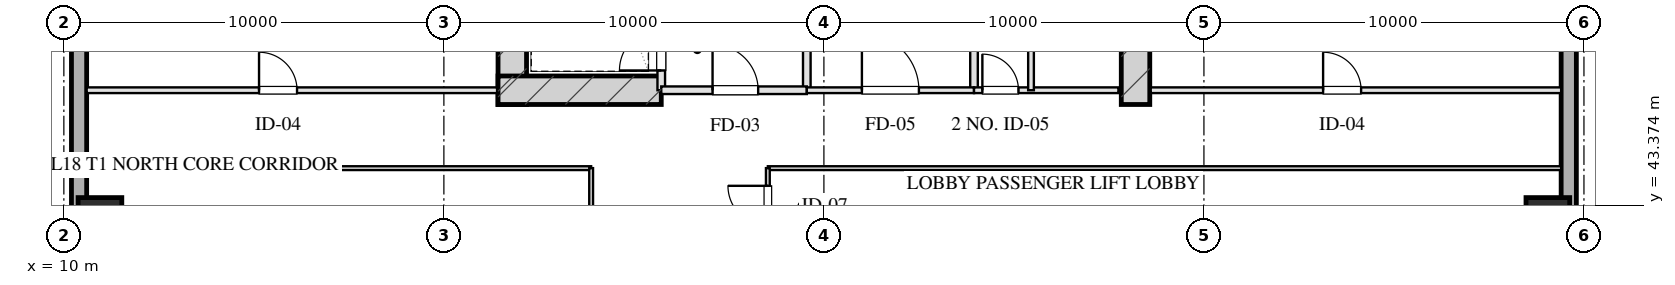
"""IFC4 building model, lengths in metres.
Left out: names, types, materials, properties, quantities, classifications, styles, units other than length and angle.
Written with IfcOpenShell. Run it as: python <this file> out.ifc"""

import sys

from ifc_helpers import new_model, si_unit, direction, frame, frame_2d, origin, origin_2d, place, context, subcontext, project, spatial, rectangle, hollow_rectangle, extrude, element, fill, save


model = new_model("IFC4")
c1 = context("Model", 3, precision=1e-05, world=origin(), true_north=direction((0.0, 1.0)))
c2 = subcontext(c1, "Body", "Model", "MODEL_VIEW")
j1 = project(units=[si_unit("LENGTHUNIT", "METRE"), si_unit("PLANEANGLEUNIT", "RADIAN")], contexts=[c1])
p1 = place(None, origin())
s1 = spatial("IfcSite", under=j1, at=p1, CompositionType="ELEMENT")
p2 = place(p1, origin())
s2 = spatial("IfcBuilding", under=s1, at=p2, CompositionType="ELEMENT")
p3 = place(p2, frame((0.0, 0.0, 74.75)))
s3 = spatial("IfcBuildingStorey", under=s2, at=p3, CompositionType="ELEMENT", Elevation=74.75)
for number, where, z_axis, x_axis in (
    (1, (21.8, 46.025, 0.0), (0.0, 0.0, 1.0), (0.0, 1.0, 0.0)),
    (2, (38.2, 46.025, 0.0), (0.0, 0.0, 1.0), (0.0, 1.0, 0.0)),
):
    element("IfcWall", number, at=place(p3, frame(where, z_axis=z_axis, x_axis=x_axis)), inside=s3, PredefinedType="SHEAR", context=c2, shape_type="SweptSolid", body=[
        extrude(rectangle(XDim=9.63, YDim=0.75, at=frame_2d((4.815, 0.0))), origin(), (0.0, 0.0, 1.0), 3.45),
    ])
p4 = place(p3, frame((21.425, 46.4, 0.0), z_axis=(0.0, 0.0, 1.0), x_axis=(1.0, 0.0, 0.0)))
e3 = element("IfcWall", 3, at=p4, inside=s3, PredefinedType="SHEAR", context=c2, shape_type="SweptSolid", body=[
    extrude(rectangle(XDim=4.295, YDim=0.75, at=frame_2d((2.147, 0.0))), origin(), (0.0, 0.0, 1.0), 3.45),
])
for number, where, z_axis, x_axis in (
    (4, (10.95, 43.0, 0.0), (0.0, 0.0, 1.0), (1.0, 0.0, 0.0)),
    (5, (49.05, 43.0, 0.0), (0.0, 0.0, 1.0), (1.0, 0.0, 0.0)),
):
    element("IfcColumn", number, at=place(p3, frame(where, z_axis=z_axis, x_axis=x_axis)), inside=s3, PredefinedType="COLUMN", context=c2, shape_type="SweptSolid", body=[
        extrude(hollow_rectangle(XDim=1.15, YDim=1.15, WallThickness=0.04, at=origin_2d()), origin(), (0.0, 0.0, 1.0), 3.451),
    ])
p5 = place(p3, frame((10.4, 7.2, 0.0), z_axis=(0.0, 0.0, 1.0), x_axis=(0.0, 1.0, 0.0)))
e6 = element("IfcWall", 6, at=p5, inside=s3, PredefinedType="SOLIDWALL", context=c2, shape_type="SweptSolid", body=[
    extrude(rectangle(XDim=53.6, YDim=0.4, at=frame_2d((26.8, 0.0))), origin(), (0.0, 0.0, 1.0), 2.61),
])
p6 = place(p5, frame((19.15, 0.0, 0.75)))
e7 = element("IfcOpeningElement", 7, at=p6, cuts=e6, PredefinedType="OPENING", context=c2, shape_type="SweptSolid", body=[
    extrude(rectangle(XDim=2.5, YDim=1.46, at=frame_2d((1.25, 0.73))), frame((0.0, 0.21, 0.0), z_axis=(0.0, -1.0, 0.0), x_axis=(1.0, 0.0, 0.0)), (0.0, 0.0, 1.0), 0.42),
])
p7 = place(p5, frame((28.15, 0.0, 0.75)))
e8 = element("IfcOpeningElement", 8, at=p7, cuts=e6, PredefinedType="OPENING", context=c2, shape_type="SweptSolid", body=[
    extrude(rectangle(XDim=2.5, YDim=1.46, at=frame_2d((1.25, 0.73))), frame((0.0, 0.21, 0.0), z_axis=(0.0, -1.0, 0.0), x_axis=(1.0, 0.0, 0.0)), (0.0, 0.0, 1.0), 0.42),
])
p8 = place(p5, frame((31.95, 0.0, 0.75)))
e9 = element("IfcOpeningElement", 9, at=p8, cuts=e6, PredefinedType="OPENING", context=c2, shape_type="SweptSolid", body=[
    extrude(rectangle(XDim=2.5, YDim=1.46, at=frame_2d((1.25, 0.73))), frame((0.0, 0.21, 0.0), z_axis=(0.0, -1.0, 0.0), x_axis=(1.0, 0.0, 0.0)), (0.0, 0.0, 1.0), 0.42),
])
p9 = place(p3, frame((49.6, 60.8, 0.0), z_axis=(0.0, 0.0, 1.0), x_axis=(0.0, -1.0, 0.0)))
e10 = element("IfcWall", 10, at=p9, inside=s3, PredefinedType="SOLIDWALL", context=c2, shape_type="SweptSolid", body=[
    extrude(rectangle(XDim=53.6, YDim=0.4, at=frame_2d((26.8, 0.0))), origin(), (0.0, 0.0, 1.0), 2.61),
])
p10 = place(p3, frame((25.72, 46.4, 0.0), z_axis=(0.0, 0.0, 1.0), x_axis=(0.0, 1.0, 0.0)))
e11 = element("IfcWall", 11, at=p10, inside=s3, PredefinedType="PARTITIONING", context=c2, shape_type="SweptSolid", body=[
    extrude(rectangle(XDim=1.9, YDim=0.2, at=frame_2d((0.95, 0.0))), origin(), (0.0, 0.0, 1.0), 3.175),
])
p11 = place(p10, frame((0.52, 0.0, 0.0)))
e12 = element("IfcOpeningElement", 12, at=p11, cuts=e11, PredefinedType="OPENING", context=c2, shape_type="SweptSolid", body=[
    extrude(rectangle(XDim=1.1, YDim=2.05, at=frame_2d((0.55, 1.025))), frame((0.0, 0.11, 0.0), z_axis=(0.0, -1.0, 0.0), x_axis=(1.0, 0.0, 0.0)), (0.0, 0.0, 1.0), 0.22),
])
p12 = place(p3, frame((29.55, 46.4, 0.0), z_axis=(0.0, 0.0, 1.0), x_axis=(0.0, 1.0, 0.0)))
e13 = element("IfcWall", 13, at=p12, inside=s3, PredefinedType="PARTITIONING", context=c2, shape_type="SweptSolid", body=[
    extrude(rectangle(XDim=8.43, YDim=0.2, at=frame_2d((4.215, 0.0))), origin(), (0.0, 0.0, 1.0), 3.175),
])
p13 = place(p3, frame((25.72, 46.4, 0.0), z_axis=(0.0, 0.0, 1.0), x_axis=(1.0, 0.0, 0.0)))
e14 = element("IfcWall", 14, at=p13, inside=s3, PredefinedType="PARTITIONING", context=c2, shape_type="SweptSolid", body=[
    extrude(rectangle(XDim=3.83, YDim=0.2, at=frame_2d((1.915, 0.0))), origin(), (0.0, 0.0, 1.0), 3.175),
])
p14 = place(p13, frame((1.35, 0.0, 0.0)))
e15 = element("IfcOpeningElement", 15, at=p14, cuts=e14, PredefinedType="OPENING", context=c2, shape_type="SweptSolid", body=[
    extrude(rectangle(XDim=1.2, YDim=2.05, at=frame_2d((0.6, 1.025))), frame((0.0, 0.11, 0.0), z_axis=(0.0, -1.0, 0.0), x_axis=(1.0, 0.0, 0.0)), (0.0, 0.0, 1.0), 0.22),
])
p15 = place(p3, frame((33.95, 46.4, 0.0), z_axis=(0.0, 0.0, 1.0), x_axis=(0.0, 1.0, 0.0)))
e16 = element("IfcWall", 16, at=p15, inside=s3, PredefinedType="PARTITIONING", context=c2, shape_type="SweptSolid", body=[
    extrude(rectangle(XDim=8.43, YDim=0.2, at=frame_2d((4.215, 0.0))), origin(), (0.0, 0.0, 1.0), 3.175),
])
p16 = place(p3, frame((29.55, 46.4, 0.0), z_axis=(0.0, 0.0, 1.0), x_axis=(1.0, 0.0, 0.0)))
e17 = element("IfcWall", 17, at=p16, inside=s3, PredefinedType="PARTITIONING", context=c2, shape_type="SweptSolid", body=[
    extrude(rectangle(XDim=4.4, YDim=0.15, at=frame_2d((2.2, 0.0))), origin(), (0.0, 0.0, 1.0), 3.175),
])
p17 = place(p16, frame((1.45, 0.0, 0.0)))
e18 = element("IfcOpeningElement", 18, at=p17, cuts=e17, PredefinedType="OPENING", context=c2, shape_type="SweptSolid", body=[
    extrude(rectangle(XDim=1.5, YDim=2.05, at=frame_2d((0.75, 1.025))), frame((0.0, 0.085, 0.0), z_axis=(0.0, -1.0, 0.0), x_axis=(1.0, 0.0, 0.0)), (0.0, 0.0, 1.0), 0.17),
])
p18 = place(p3, frame((33.95, 46.4, 0.0), z_axis=(0.0, 0.0, 1.0), x_axis=(1.0, 0.0, 0.0)))
e19 = element("IfcWall", 19, at=p18, inside=s3, PredefinedType="PARTITIONING", context=c2, shape_type="SweptSolid", body=[
    extrude(rectangle(XDim=3.8, YDim=0.15, at=frame_2d((1.9, 0.0))), origin(), (0.0, 0.0, 1.0), 3.175),
])
p19 = place(p18, frame((0.22, 0.0, 0.0)))
e20 = element("IfcOpeningElement", 20, at=p19, cuts=e19, PredefinedType="OPENING", context=c2, shape_type="SweptSolid", body=[
    extrude(rectangle(XDim=0.95, YDim=2.05, at=frame_2d((0.475, 1.025))), frame((0.0, 0.085, 0.0), z_axis=(0.0, -1.0, 0.0), x_axis=(1.0, 0.0, 0.0)), (0.0, 0.0, 1.0), 0.17),
])
p20 = place(p3, frame((35.45, 46.4, 0.0), z_axis=(0.0, 0.0, 1.0), x_axis=(0.0, 1.0, 0.0)))
e21 = element("IfcWall", 21, at=p20, inside=s3, PredefinedType="PARTITIONING", context=c2, shape_type="SweptSolid", body=[
    extrude(rectangle(XDim=8.43, YDim=0.15, at=frame_2d((4.215, 0.0))), origin(), (0.0, 0.0, 1.0), 2.765),
])
p21 = place(p20, frame((2.55, 0.0, 0.0)))
e22 = element("IfcOpeningElement", 22, at=p21, cuts=e21, PredefinedType="OPENING", context=c2, shape_type="SweptSolid", body=[
    extrude(rectangle(XDim=0.95, YDim=2.05, at=frame_2d((0.475, 1.025))), frame((0.0, 0.085, 0.0), z_axis=(0.0, -1.0, 0.0), x_axis=(1.0, 0.0, 0.0)), (0.0, 0.0, 1.0), 0.17),
])
p22 = place(p20, frame((4.7, 0.0, 0.0)))
e23 = element("IfcOpeningElement", 23, at=p22, cuts=e21, PredefinedType="OPENING", context=c2, shape_type="SweptSolid", body=[
    extrude(rectangle(XDim=0.9, YDim=2.05, at=frame_2d((0.45, 1.025))), frame((0.0, 0.085, 0.0), z_axis=(0.0, -1.0, 0.0), x_axis=(1.0, 0.0, 0.0)), (0.0, 0.0, 1.0), 0.17),
])
p23 = place(p20, frame((6.8, 0.0, 0.0)))
e24 = element("IfcOpeningElement", 24, at=p23, cuts=e21, PredefinedType="OPENING", context=c2, shape_type="SweptSolid", body=[
    extrude(rectangle(XDim=0.9, YDim=2.05, at=frame_2d((0.45, 1.025))), frame((0.0, 0.085, 0.0), z_axis=(0.0, -1.0, 0.0), x_axis=(1.0, 0.0, 0.0)), (0.0, 0.0, 1.0), 0.17),
])
p24 = place(p3, frame((10.6, 46.4, 0.0), z_axis=(0.0, 0.0, 1.0), x_axis=(1.0, 0.0, 0.0)))
e25 = element("IfcWall", 25, at=p24, inside=s3, PredefinedType="PARTITIONING", context=c2, shape_type="SweptSolid", body=[
    extrude(rectangle(XDim=10.8, YDim=0.15, at=frame_2d((5.4, 0.0))), origin(), (0.0, 0.0, 1.0), 3.175),
])
p25 = place(p24, frame((4.536, 0.0, 0.0)))
e26 = element("IfcOpeningElement", 26, at=p25, cuts=e25, PredefinedType="OPENING", context=c2, shape_type="SweptSolid", body=[
    extrude(rectangle(XDim=1.0, YDim=2.05, at=frame_2d((0.5, 1.025))), frame((0.0, 0.085, 0.0), z_axis=(0.0, -1.0, 0.0), x_axis=(1.0, 0.0, 0.0)), (0.0, 0.0, 1.0), 0.17),
])
p26 = place(p3, frame((38.6, 46.4, 0.0), z_axis=(0.0, 0.0, 1.0), x_axis=(1.0, 0.0, 0.0)))
e27 = element("IfcWall", 27, at=p26, inside=s3, PredefinedType="PARTITIONING", context=c2, shape_type="SweptSolid", body=[
    extrude(rectangle(XDim=10.8, YDim=0.15, at=frame_2d((5.4, 0.0))), origin(), (0.0, 0.0, 1.0), 3.175),
])
p27 = place(p26, frame((4.536, 0.0, 0.0)))
e28 = element("IfcOpeningElement", 28, at=p27, cuts=e27, PredefinedType="OPENING", context=c2, shape_type="SweptSolid", body=[
    extrude(rectangle(XDim=1.0, YDim=2.05, at=frame_2d((0.5, 1.025))), frame((0.0, 0.085, 0.0), z_axis=(0.0, -1.0, 0.0), x_axis=(1.0, 0.0, 0.0)), (0.0, 0.0, 1.0), 0.17),
])
p28 = place(p3, frame((10.6, 44.35, 0.0), z_axis=(0.0, 0.0, 1.0), x_axis=(1.0, 0.0, 0.0)))
e29 = element("IfcWall", 29, at=p28, inside=s3, PredefinedType="MOVABLE", context=c2, shape_type="SweptSolid", body=[
    extrude(rectangle(XDim=13.275, YDim=0.1, at=frame_2d((6.637, 0.0))), origin(), (0.0, 0.0, 1.0), 3.175),
])
p29 = place(p3, frame((28.525, 44.35, 0.0), z_axis=(0.0, 0.0, 1.0), x_axis=(1.0, 0.0, 0.0)))
e30 = element("IfcWall", 30, at=p29, inside=s3, PredefinedType="MOVABLE", context=c2, shape_type="SweptSolid", body=[
    extrude(rectangle(XDim=20.875, YDim=0.1, at=frame_2d((10.438, 0.0))), origin(), (0.0, 0.0, 1.0), 3.175),
])
p30 = place(p3, frame((23.875, 23.65, 0.0), z_axis=(0.0, 0.0, 1.0), x_axis=(0.0, 1.0, 0.0)))
e31 = element("IfcWall", 31, at=p30, inside=s3, PredefinedType="MOVABLE", context=c2, shape_type="SweptSolid", body=[
    extrude(rectangle(XDim=20.7, YDim=0.1, at=frame_2d((10.35, 0.0))), origin(), (0.0, 0.0, 1.0), 3.175),
])
p31 = place(p30, frame((4.075, 0.0, 0.0)))
e32 = element("IfcOpeningElement", 32, at=p31, cuts=e31, PredefinedType="OPENING", context=c2, shape_type="SweptSolid", body=[
    extrude(rectangle(XDim=1.05, YDim=2.05, at=frame_2d((0.525, 1.025))), frame((0.0, 0.06, 0.0), z_axis=(0.0, -1.0, 0.0), x_axis=(1.0, 0.0, 0.0)), (0.0, 0.0, 1.0), 0.12),
])
p32 = place(p30, frame((14.425, 0.0, 0.0)))
e33 = element("IfcOpeningElement", 33, at=p32, cuts=e31, PredefinedType="OPENING", context=c2, shape_type="SweptSolid", body=[
    extrude(rectangle(XDim=1.0, YDim=2.05, at=frame_2d((0.5, 1.025))), frame((0.0, 0.06, 0.0), z_axis=(0.0, -1.0, 0.0), x_axis=(1.0, 0.0, 0.0)), (0.0, 0.0, 1.0), 0.12),
])
p33 = place(p3, frame((28.525, 23.65, 0.0), z_axis=(0.0, 0.0, 1.0), x_axis=(0.0, 1.0, 0.0)))
e34 = element("IfcWall", 34, at=p33, inside=s3, PredefinedType="MOVABLE", context=c2, shape_type="SweptSolid", body=[
    extrude(rectangle(XDim=20.7, YDim=0.1, at=frame_2d((10.35, 0.0))), origin(), (0.0, 0.0, 1.0), 3.175),
])
p34 = place(p33, frame((0.775, 0.0, 0.0)))
e35 = element("IfcOpeningElement", 35, at=p34, cuts=e34, PredefinedType="OPENING", context=c2, shape_type="SweptSolid", body=[
    extrude(rectangle(XDim=1.0, YDim=2.05, at=frame_2d((0.5, 1.025))), frame((0.0, 0.06, 0.0), z_axis=(0.0, -1.0, 0.0), x_axis=(1.0, 0.0, 0.0)), (0.0, 0.0, 1.0), 0.12),
])
p35 = place(p33, frame((3.95, 0.0, 0.0)))
e36 = element("IfcOpeningElement", 36, at=p35, cuts=e34, PredefinedType="OPENING", context=c2, shape_type="SweptSolid", body=[
    extrude(rectangle(XDim=1.0, YDim=2.05, at=frame_2d((0.5, 1.025))), frame((0.0, 0.06, 0.0), z_axis=(0.0, -1.0, 0.0), x_axis=(1.0, 0.0, 0.0)), (0.0, 0.0, 1.0), 0.12),
])
p36 = place(p33, frame((7.51, 0.0, 0.0)))
e37 = element("IfcOpeningElement", 37, at=p36, cuts=e34, PredefinedType="OPENING", context=c2, shape_type="SweptSolid", body=[
    extrude(rectangle(XDim=1.0, YDim=2.05, at=frame_2d((0.5, 1.025))), frame((0.0, 0.06, 0.0), z_axis=(0.0, -1.0, 0.0), x_axis=(1.0, 0.0, 0.0)), (0.0, 0.0, 1.0), 0.12),
])
p37 = place(p33, frame((11.51, 0.0, 0.0)))
e38 = element("IfcOpeningElement", 38, at=p37, cuts=e34, PredefinedType="OPENING", context=c2, shape_type="SweptSolid", body=[
    extrude(rectangle(XDim=0.85, YDim=2.05, at=frame_2d((0.425, 1.025))), frame((0.0, 0.06, 0.0), z_axis=(0.0, -1.0, 0.0), x_axis=(1.0, 0.0, 0.0)), (0.0, 0.0, 1.0), 0.12),
])
p38 = place(p33, frame((15.75, 0.0, 0.0)))
e39 = element("IfcOpeningElement", 39, at=p38, cuts=e34, PredefinedType="OPENING", context=c2, shape_type="SweptSolid", body=[
    extrude(rectangle(XDim=1.0, YDim=2.05, at=frame_2d((0.5, 1.025))), frame((0.0, 0.06, 0.0), z_axis=(0.0, -1.0, 0.0), x_axis=(1.0, 0.0, 0.0)), (0.0, 0.0, 1.0), 0.12),
])
p39 = place(p33, frame((19.185, 0.0, 0.0)))
e40 = element("IfcOpeningElement", 40, at=p39, cuts=e34, PredefinedType="OPENING", context=c2, shape_type="SweptSolid", body=[
    extrude(rectangle(XDim=1.05, YDim=2.05, at=frame_2d((0.525, 1.025))), frame((0.0, 0.06, 0.0), z_axis=(0.0, -1.0, 0.0), x_axis=(1.0, 0.0, 0.0)), (0.0, 0.0, 1.0), 0.12),
])
p40 = place(p11, origin())
e41 = element("IfcDoor", 41, at=p40, inside=s3, OperationType="SINGLE_SWING_LEFT", PredefinedType="DOOR", context=c2, shape_type="SweptSolid", body=[
    extrude(rectangle(XDim=1.1, YDim=2.05, at=frame_2d((0.55, 1.025))), frame((0.0, 0.025, 0.0), z_axis=(0.0, -1.0, 0.0), x_axis=(1.0, 0.0, 0.0)), (0.0, 0.0, 1.0), 0.05),
])
fill(e12, e41)
p41 = place(p14, origin())
e42 = element("IfcDoor", 42, at=p41, inside=s3, OperationType="SINGLE_SWING_LEFT", PredefinedType="DOOR", context=c2, shape_type="SweptSolid", body=[
    extrude(rectangle(XDim=1.2, YDim=2.05, at=frame_2d((0.6, 1.025))), frame((0.0, 0.025, 0.0), z_axis=(0.0, -1.0, 0.0), x_axis=(1.0, 0.0, 0.0)), (0.0, 0.0, 1.0), 0.05),
])
fill(e15, e42)
p42 = place(p17, origin())
e43 = element("IfcDoor", 43, at=p42, inside=s3, OperationType="SINGLE_SWING_LEFT", PredefinedType="DOOR", context=c2, shape_type="SweptSolid", body=[
    extrude(rectangle(XDim=1.5, YDim=2.05, at=frame_2d((0.75, 1.025))), frame((0.0, 0.025, 0.0), z_axis=(0.0, -1.0, 0.0), x_axis=(1.0, 0.0, 0.0)), (0.0, 0.0, 1.0), 0.05),
])
fill(e18, e43)
p43 = place(p19, origin())
e44 = element("IfcDoor", 44, at=p43, inside=s3, OperationType="SINGLE_SWING_LEFT", PredefinedType="DOOR", context=c2, shape_type="SweptSolid", body=[
    extrude(rectangle(XDim=0.95, YDim=2.05, at=frame_2d((0.475, 1.025))), frame((0.0, 0.025, 0.0), z_axis=(0.0, -1.0, 0.0), x_axis=(1.0, 0.0, 0.0)), (0.0, 0.0, 1.0), 0.05),
])
fill(e20, e44)
p44 = place(p25, origin())
e45 = element("IfcDoor", 45, at=p44, inside=s3, OperationType="SINGLE_SWING_LEFT", PredefinedType="DOOR", context=c2, shape_type="SweptSolid", body=[
    extrude(rectangle(XDim=1.0, YDim=2.05, at=frame_2d((0.5, 1.025))), frame((0.0, 0.025, 0.0), z_axis=(0.0, -1.0, 0.0), x_axis=(1.0, 0.0, 0.0)), (0.0, 0.0, 1.0), 0.05),
])
fill(e26, e45)
p45 = place(p27, origin())
e46 = element("IfcDoor", 46, at=p45, inside=s3, OperationType="SINGLE_SWING_LEFT", PredefinedType="DOOR", context=c2, shape_type="SweptSolid", body=[
    extrude(rectangle(XDim=1.0, YDim=2.05, at=frame_2d((0.5, 1.025))), frame((0.0, 0.025, 0.0), z_axis=(0.0, -1.0, 0.0), x_axis=(1.0, 0.0, 0.0)), (0.0, 0.0, 1.0), 0.05),
])
fill(e28, e46)
p46 = place(p39, origin())
e47 = element("IfcDoor", 47, at=p46, inside=s3, OperationType="SINGLE_SWING_RIGHT", PredefinedType="DOOR", context=c2, shape_type="SweptSolid", body=[
    extrude(rectangle(XDim=1.05, YDim=2.05, at=frame_2d((0.525, 1.025))), frame((0.0, 0.025, 0.0), z_axis=(0.0, -1.0, 0.0), x_axis=(1.0, 0.0, 0.0)), (0.0, 0.0, 1.0), 0.05),
])
fill(e40, e47)
save(model, sys.argv[1])
